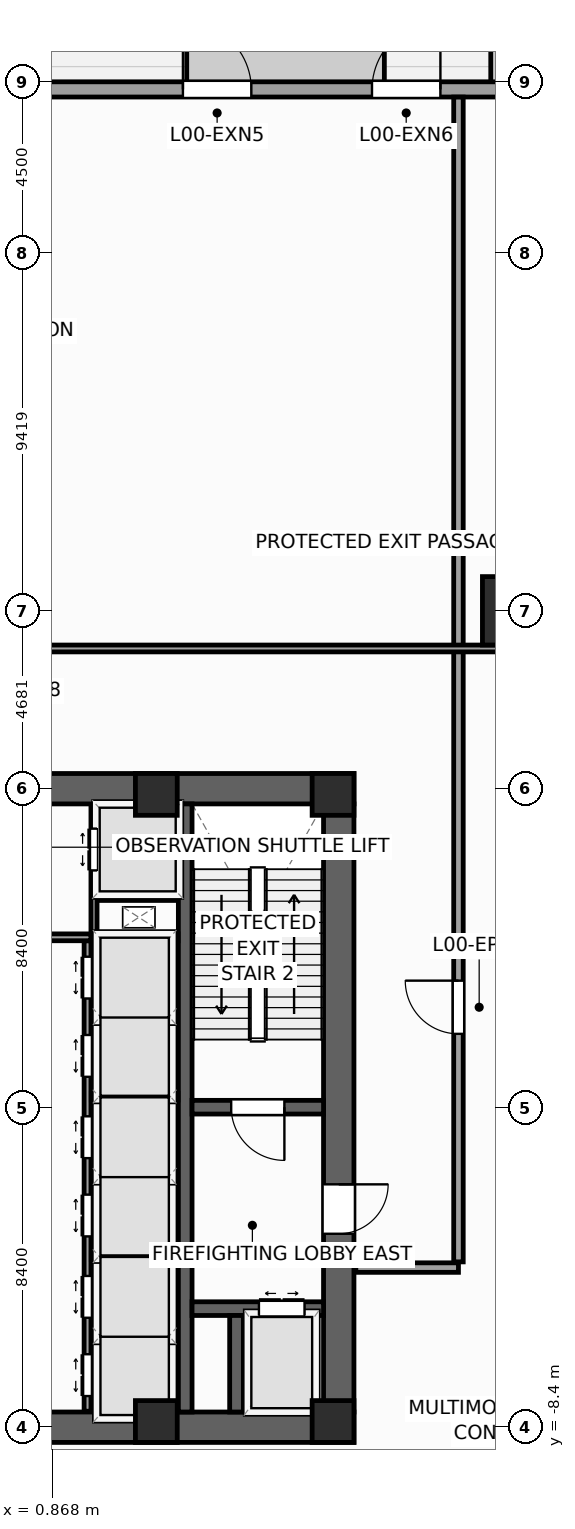
"""IFC4 building model, lengths in metres.
Left out: names, types, materials, properties, quantities, classifications, styles, units other than length and angle.
Written with IfcOpenShell. Run it as: python <this file> out.ifc"""

import sys

from ifc_helpers import new_model, si_unit, direction, frame, frame_2d, origin, origin_2d, place, context, subcontext, project, spatial, rectangle, extrude, source, transform, mapped, element, fill, save


model = new_model("IFC4")
c1 = context("Model", 3, precision=1e-05, world=origin(), true_north=direction((0.0, 1.0)))
c2 = subcontext(c1, "Body", "Model", "MODEL_VIEW")
j1 = project(units=[si_unit("LENGTHUNIT", "METRE"), si_unit("PLANEANGLEUNIT", "RADIAN")], contexts=[c1])
p1 = place(None, origin())
s1 = spatial("IfcSite", under=j1, at=p1, CompositionType="ELEMENT")
p2 = place(p1, origin())
s2 = spatial("IfcBuilding", under=s1, at=p2, CompositionType="ELEMENT")
p3 = place(p2, origin())
s3 = spatial("IfcBuildingStorey", under=s2, at=p3, CompositionType="ELEMENT", Elevation=0.0)
p4 = place(p3, frame((-8.8, -8.4, 0.0), z_axis=(0.0, 0.0, 1.0), x_axis=(1.0, 0.0, 0.0)))
e1 = element("IfcWall", 1, at=p4, inside=s3, PredefinedType="SHEAR", context=c2, shape_type="SweptSolid", body=[
    extrude(rectangle(XDim=17.6, YDim=0.8, at=frame_2d((8.8, 0.0))), origin(), (0.0, 0.0, 1.0), 6.0),
])
p5 = place(p4, frame((8.15, 0.0, 0.0)))
e2 = element("IfcOpeningElement", 2, at=p5, cuts=e1, PredefinedType="OPENING", context=c2, shape_type="SweptSolid", body=[
    extrude(rectangle(XDim=1.3, YDim=2.2, at=frame_2d((0.65, 1.1))), frame((0.0, 0.41, 0.0), z_axis=(0.0, -1.0, 0.0), x_axis=(1.0, 0.0, 0.0)), (0.0, 0.0, 1.0), 0.82),
])
p6 = place(p3, frame((-8.8, 8.4, 0.0), z_axis=(0.0, 0.0, 1.0), x_axis=(1.0, 0.0, 0.0)))
e3 = element("IfcWall", 3, at=p6, inside=s3, PredefinedType="SHEAR", context=c2, shape_type="SweptSolid", body=[
    extrude(rectangle(XDim=17.6, YDim=0.8, at=frame_2d((8.8, 0.0))), origin(), (0.0, 0.0, 1.0), 6.0),
])
p7 = place(p6, frame((8.15, 0.0, 0.0)))
e4 = element("IfcOpeningElement", 4, at=p7, cuts=e3, PredefinedType="OPENING", context=c2, shape_type="SweptSolid", body=[
    extrude(rectangle(XDim=1.3, YDim=2.2, at=frame_2d((0.65, 1.1))), frame((0.0, 0.41, 0.0), z_axis=(0.0, -1.0, 0.0), x_axis=(1.0, 0.0, 0.0)), (0.0, 0.0, 1.0), 0.82),
])
p8 = place(p3, frame((8.4, -8.0, 0.0), z_axis=(0.0, 0.0, 1.0), x_axis=(0.0, 1.0, 0.0)))
e5 = element("IfcWall", 5, at=p8, inside=s3, PredefinedType="SHEAR", context=c2, shape_type="SweptSolid", body=[
    extrude(rectangle(XDim=16.0, YDim=0.8, at=frame_2d((8.0, 0.0))), origin(), (0.0, 0.0, 1.0), 6.0),
])
p9 = place(p8, frame((4.69, 0.0, 0.0)))
e6 = element("IfcOpeningElement", 6, at=p9, cuts=e5, PredefinedType="OPENING", context=c2, shape_type="SweptSolid", body=[
    extrude(rectangle(XDim=1.3, YDim=2.2, at=frame_2d((0.65, 1.1))), frame((0.0, 0.41, 0.0), z_axis=(0.0, -1.0, 0.0), x_axis=(1.0, 0.0, 0.0)), (0.0, 0.0, 1.0), 0.82),
])
p10 = place(p3, frame((4.36, -8.0, 0.0), z_axis=(0.0, 0.0, 1.0), x_axis=(0.0, 1.0, 0.0)))
e7 = element("IfcWall", 7, at=p10, inside=s3, PredefinedType="SHEAR", context=c2, shape_type="SweptSolid", body=[
    extrude(rectangle(XDim=16.0, YDim=0.36, at=frame_2d((8.0, 0.0))), origin(), (0.0, 0.0, 1.0), 6.0),
])
p11 = place(p3, frame((4.54, 0.02, 0.0), z_axis=(0.0, 0.0, 1.0), x_axis=(1.0, 0.0, 0.0)))
e8 = element("IfcWall", 8, at=p11, inside=s3, PredefinedType="SHEAR", context=c2, shape_type="SweptSolid", body=[
    extrude(rectangle(XDim=3.46, YDim=0.36, at=frame_2d((1.73, 0.0))), origin(), (0.0, 0.0, 1.0), 6.0),
])
p12 = place(p11, frame((1.03, 0.0, 0.0)))
e9 = element("IfcOpeningElement", 9, at=p12, cuts=e8, PredefinedType="OPENING", context=c2, shape_type="SweptSolid", body=[
    extrude(rectangle(XDim=1.4, YDim=2.2, at=frame_2d((0.7, 1.1))), frame((0.0, 0.19, 0.0), z_axis=(0.0, -1.0, 0.0), x_axis=(1.0, 0.0, 0.0)), (0.0, 0.0, 1.0), 0.38),
])
p13 = place(p3, frame((4.54, -5.28, 0.0), z_axis=(0.0, 0.0, 1.0), x_axis=(1.0, 0.0, 0.0)))
e10 = element("IfcWall", 10, at=p13, inside=s3, PredefinedType="SHEAR", context=c2, shape_type="SweptSolid", body=[
    extrude(rectangle(XDim=3.46, YDim=0.36, at=frame_2d((1.73, 0.0))), origin(), (0.0, 0.0, 1.0), 6.0),
])
p14 = place(p13, frame((1.76, 0.0, 0.0)))
e11 = element("IfcOpeningElement", 11, at=p14, cuts=e10, PredefinedType="OPENING", context=c2, shape_type="SweptSolid", body=[
    extrude(rectangle(XDim=1.2, YDim=2.25, at=frame_2d((0.6, 1.125))), frame((0.0, 0.19, 0.0), z_axis=(0.0, -1.0, 0.0), x_axis=(1.0, 0.0, 0.0)), (0.0, 0.0, 1.0), 0.38),
])
p15 = place(p3, frame((5.71, -8.0, 0.0), z_axis=(0.0, 0.0, 1.0), x_axis=(0.0, 1.0, 0.0)))
e12 = element("IfcWall", 12, at=p15, inside=s3, PredefinedType="SHEAR", context=c2, shape_type="SweptSolid", body=[
    extrude(rectangle(XDim=2.54, YDim=0.36, at=frame_2d((1.27, 0.0))), origin(), (0.0, 0.0, 1.0), 6.0),
])
m1 = source(origin(), c2, "Body", "SweptSolid", [
    extrude(rectangle(XDim=1.1, YDim=1.1, at=origin_2d()), origin(), (0.0, 0.0, 1.0), 6.0),
])
for number, where, z_axis, x_axis in (
    (13, (8.25, -8.25, 0.0), (0.0, 0.0, 1.0), (1.0, 0.0, 0.0)),
    (14, (8.25, 8.25, 0.0), (0.0, 0.0, 1.0), (1.0, 0.0, 0.0)),
    (15, (3.6, -8.25, 0.0), (0.0, 0.0, 1.0), (1.0, 0.0, 0.0)),
    (16, (3.6, 8.25, 0.0), (0.0, 0.0, 1.0), (1.0, 0.0, 0.0)),
):
    element("IfcColumn", number, at=place(p3, frame(where, z_axis=z_axis, x_axis=x_axis)), inside=s3, PredefinedType="PILASTER", context=c2, shape_type="MappedRepresentation", body=[
        mapped(m1, transform((0.0, 0.0, 0.0), scale=1.0)),
    ])
m2 = source(origin(), c2, "Body", "SweptSolid", [
    extrude(rectangle(XDim=1.8, YDim=1.8, at=origin_2d()), origin(), (0.0, 0.0, 1.0), 6.0),
])
p16 = place(p3, frame((13.081, 13.081, 0.0), z_axis=(0.0, 0.0, 1.0), x_axis=(1.0, 0.0, 0.0)))
e17 = element("IfcColumn", 17, at=p16, inside=s3, PredefinedType="COLUMN", context=c2, shape_type="MappedRepresentation", body=[
    mapped(m2, transform((0.0, 0.0, 0.0), scale=1.0)),
])
p17 = place(p3, frame((-30.0, 26.8, 0.0), z_axis=(0.0, 0.0, 1.0), x_axis=(1.0, 0.0, 0.0)))
e18 = element("IfcWall", 18, at=p17, inside=s3, PredefinedType="STANDARD", context=c2, shape_type="SweptSolid", body=[
    extrude(rectangle(XDim=50.0, YDim=0.4, at=frame_2d((25.0, 0.0))), origin(), (0.0, 0.0, 1.0), 5.66),
])
p18 = place(p17, frame((9.6, 0.0, 0.0)))
e19 = element("IfcOpeningElement", 19, at=p18, cuts=e18, PredefinedType="OPENING", context=c2, shape_type="SweptSolid", body=[
    extrude(rectangle(XDim=1.8, YDim=2.4, at=frame_2d((0.9, 1.2))), frame((0.0, 0.21, 0.0), z_axis=(0.0, -1.0, 0.0), x_axis=(1.0, 0.0, 0.0)), (0.0, 0.0, 1.0), 0.42),
])
p19 = place(p17, frame((14.3, 0.0, 0.0)))
e20 = element("IfcOpeningElement", 20, at=p19, cuts=e18, PredefinedType="OPENING", context=c2, shape_type="SweptSolid", body=[
    extrude(rectangle(XDim=1.8, YDim=2.4, at=frame_2d((0.9, 1.2))), frame((0.0, 0.21, 0.0), z_axis=(0.0, -1.0, 0.0), x_axis=(1.0, 0.0, 0.0)), (0.0, 0.0, 1.0), 0.42),
])
p20 = place(p17, frame((18.925, 0.0, 0.0)))
e21 = element("IfcOpeningElement", 21, at=p20, cuts=e18, PredefinedType="OPENING", context=c2, shape_type="SweptSolid", body=[
    extrude(rectangle(XDim=1.8, YDim=2.4, at=frame_2d((0.9, 1.2))), frame((0.0, 0.21, 0.0), z_axis=(0.0, -1.0, 0.0), x_axis=(1.0, 0.0, 0.0)), (0.0, 0.0, 1.0), 0.42),
])
p21 = place(p17, frame((23.9, 0.0, 0.0)))
e22 = element("IfcOpeningElement", 22, at=p21, cuts=e18, PredefinedType="OPENING", context=c2, shape_type="SweptSolid", body=[
    extrude(rectangle(XDim=1.8, YDim=2.4, at=frame_2d((0.9, 1.2))), frame((0.0, 0.21, 0.0), z_axis=(0.0, -1.0, 0.0), x_axis=(1.0, 0.0, 0.0)), (0.0, 0.0, 1.0), 0.42),
])
p22 = place(p17, frame((34.3, 0.0, 0.0)))
e23 = element("IfcOpeningElement", 23, at=p22, cuts=e18, PredefinedType="OPENING", context=c2, shape_type="SweptSolid", body=[
    extrude(rectangle(XDim=1.8, YDim=2.4, at=frame_2d((0.9, 1.2))), frame((0.0, 0.21, 0.0), z_axis=(0.0, -1.0, 0.0), x_axis=(1.0, 0.0, 0.0)), (0.0, 0.0, 1.0), 0.42),
])
p23 = place(p17, frame((39.275, 0.0, 0.0)))
e24 = element("IfcOpeningElement", 24, at=p23, cuts=e18, PredefinedType="OPENING", context=c2, shape_type="SweptSolid", body=[
    extrude(rectangle(XDim=1.8, YDim=2.4, at=frame_2d((0.9, 1.2))), frame((0.0, 0.21, 0.0), z_axis=(0.0, -1.0, 0.0), x_axis=(1.0, 0.0, 0.0)), (0.0, 0.0, 1.0), 0.42),
])
p24 = place(p17, frame((46.6, 0.0, 0.0)))
e25 = element("IfcOpeningElement", 25, at=p24, cuts=e18, PredefinedType="OPENING", context=c2, shape_type="SweptSolid", body=[
    extrude(rectangle(XDim=1.8, YDim=2.4, at=frame_2d((0.9, 1.2))), frame((0.0, 0.21, 0.0), z_axis=(0.0, -1.0, 0.0), x_axis=(1.0, 0.0, 0.0)), (0.0, 0.0, 1.0), 0.42),
])
p25 = place(p3, frame((1.79, -7.98, 0.0), z_axis=(0.0, 0.0, 1.0), x_axis=(0.0, 1.0, 0.0)))
e26 = element("IfcWall", 26, at=p25, inside=s3, PredefinedType="PARTITIONING", context=c2, shape_type="SweptSolid", body=[
    extrude(rectangle(XDim=12.38, YDim=0.18, at=frame_2d((6.19, 0.0))), origin(), (0.0, 0.0, 1.0), 5.66),
])
p26 = place(p25, frame((0.4, 0.0, 0.0)))
e27 = element("IfcOpeningElement", 27, at=p26, cuts=e26, PredefinedType="OPENING", context=c2, shape_type="SweptSolid", body=[
    extrude(rectangle(XDim=1.1, YDim=2.2, at=frame_2d((0.55, 1.1))), frame((0.0, 0.1, 0.0), z_axis=(0.0, -1.0, 0.0), x_axis=(1.0, 0.0, 0.0)), (0.0, 0.0, 1.0), 0.2),
])
p27 = place(p25, frame((2.46, 0.0, 0.0)))
e28 = element("IfcOpeningElement", 28, at=p27, cuts=e26, PredefinedType="OPENING", context=c2, shape_type="SweptSolid", body=[
    extrude(rectangle(XDim=1.1, YDim=2.2, at=frame_2d((0.55, 1.1))), frame((0.0, 0.1, 0.0), z_axis=(0.0, -1.0, 0.0), x_axis=(1.0, 0.0, 0.0)), (0.0, 0.0, 1.0), 0.2),
])
p28 = place(p25, frame((4.6, 0.0, 0.0)))
e29 = element("IfcOpeningElement", 29, at=p28, cuts=e26, PredefinedType="OPENING", context=c2, shape_type="SweptSolid", body=[
    extrude(rectangle(XDim=1.1, YDim=2.2, at=frame_2d((0.55, 1.1))), frame((0.0, 0.1, 0.0), z_axis=(0.0, -1.0, 0.0), x_axis=(1.0, 0.0, 0.0)), (0.0, 0.0, 1.0), 0.2),
])
p29 = place(p25, frame((6.66, 0.0, 0.0)))
e30 = element("IfcOpeningElement", 30, at=p29, cuts=e26, PredefinedType="OPENING", context=c2, shape_type="SweptSolid", body=[
    extrude(rectangle(XDim=1.1, YDim=2.2, at=frame_2d((0.55, 1.1))), frame((0.0, 0.1, 0.0), z_axis=(0.0, -1.0, 0.0), x_axis=(1.0, 0.0, 0.0)), (0.0, 0.0, 1.0), 0.2),
])
p30 = place(p25, frame((8.8, 0.0, 0.0)))
e31 = element("IfcOpeningElement", 31, at=p30, cuts=e26, PredefinedType="OPENING", context=c2, shape_type="SweptSolid", body=[
    extrude(rectangle(XDim=1.1, YDim=2.2, at=frame_2d((0.55, 1.1))), frame((0.0, 0.1, 0.0), z_axis=(0.0, -1.0, 0.0), x_axis=(1.0, 0.0, 0.0)), (0.0, 0.0, 1.0), 0.2),
])
p31 = place(p25, frame((10.86, 0.0, 0.0)))
e32 = element("IfcOpeningElement", 32, at=p31, cuts=e26, PredefinedType="OPENING", context=c2, shape_type="SweptSolid", body=[
    extrude(rectangle(XDim=1.1, YDim=2.2, at=frame_2d((0.55, 1.1))), frame((0.0, 0.1, 0.0), z_axis=(0.0, -1.0, 0.0), x_axis=(1.0, 0.0, 0.0)), (0.0, 0.0, 1.0), 0.2),
])
p32 = place(p3, frame((-1.88, 4.49, 0.0), z_axis=(0.0, 0.0, 1.0), x_axis=(1.0, 0.0, 0.0)))
e33 = element("IfcWall", 33, at=p32, inside=s3, PredefinedType="PARTITIONING", context=c2, shape_type="SweptSolid", body=[
    extrude(rectangle(XDim=3.76, YDim=0.18, at=frame_2d((1.88, 0.0))), origin(), (0.0, 0.0, 1.0), 5.66),
])
p33 = place(p32, frame((1.23, 0.0, 0.0)))
e34 = element("IfcOpeningElement", 34, at=p33, cuts=e33, PredefinedType="OPENING", context=c2, shape_type="SweptSolid", body=[
    extrude(rectangle(XDim=1.3, YDim=2.2, at=frame_2d((0.65, 1.1))), frame((0.0, 0.1, 0.0), z_axis=(0.0, -1.0, 0.0), x_axis=(1.0, 0.0, 0.0)), (0.0, 0.0, 1.0), 0.2),
])
for number, where, z_axis, x_axis in (
    (35, (1.89, -3.9, 0.0), (0.0, 0.0, 1.0), (1.0, 0.0, 0.0)),
    (36, (1.89, 0.3, 0.0), (0.0, 0.0, 1.0), (1.0, 0.0, 0.0)),
    (37, (1.89, 4.49, 0.0), (0.0, 0.0, 1.0), (1.0, 0.0, 0.0)),
):
    element("IfcWall", number, at=place(p3, frame(where, z_axis=z_axis, x_axis=x_axis)), inside=s3, PredefinedType="PARTITIONING", context=c2, shape_type="SweptSolid", body=[
        extrude(rectangle(XDim=2.28, YDim=0.18, at=frame_2d((1.14, 0.0))), origin(), (0.0, 0.0, 1.0), 5.66),
    ])
for number, where, z_axis, x_axis in (
    (38, (1.9, -6.0, 0.0), (0.0, 0.0, 1.0), (1.0, 0.0, 0.0)),
    (39, (1.9, -1.8, 0.0), (0.0, 0.0, 1.0), (1.0, 0.0, 0.0)),
    (40, (1.9, 2.4, 0.0), (0.0, 0.0, 1.0), (1.0, 0.0, 0.0)),
):
    element("IfcWall", number, at=place(p3, frame(where, z_axis=z_axis, x_axis=x_axis)), inside=s3, PredefinedType="PARTITIONING", context=c2, shape_type="SweptSolid", body=[
        extrude(rectangle(XDim=2.26, YDim=0.12, at=frame_2d((1.13, 0.0))), origin(), (0.0, 0.0, 1.0), 5.66),
    ])
p34 = place(p3, frame((1.96, 4.58, 0.0), z_axis=(0.0, 0.0, 1.0), x_axis=(0.0, 1.0, 0.0)))
e41 = element("IfcWall", 41, at=p34, inside=s3, PredefinedType="PARTITIONING", context=c2, shape_type="SweptSolid", body=[
    extrude(rectangle(XDim=3.4, YDim=0.16, at=frame_2d((1.7, 0.0))), origin(), (0.0, 0.0, 1.0), 5.66),
])
p35 = place(p34, frame((1.67, 0.0, 0.0)))
e42 = element("IfcOpeningElement", 42, at=p35, cuts=e41, PredefinedType="OPENING", context=c2, shape_type="SweptSolid", body=[
    extrude(rectangle(XDim=1.1, YDim=2.2, at=frame_2d((0.55, 1.1))), frame((0.0, 0.09, 0.0), z_axis=(0.0, -1.0, 0.0), x_axis=(1.0, 0.0, 0.0)), (0.0, 0.0, 1.0), 0.18),
])
p36 = place(p3, frame((2.06, 5.52, 0.0), z_axis=(0.0, 0.0, 1.0), x_axis=(1.0, 0.0, 0.0)))
e43 = element("IfcWall", 43, at=p36, inside=s3, PredefinedType="PARTITIONING", context=c2, shape_type="SweptSolid", body=[
    extrude(rectangle(XDim=2.1, YDim=0.12, at=frame_2d((1.05, 0.0))), origin(), (0.0, 0.0, 1.0), 5.66),
])
p37 = place(p3, frame((11.55, -4.05, 0.0), z_axis=(0.0, 0.0, 1.0), x_axis=(0.0, 1.0, 0.0)))
e44 = element("IfcWall", 44, at=p37, inside=s3, PredefinedType="PARTITIONING", context=c2, shape_type="SweptSolid", body=[
    extrude(rectangle(XDim=30.648, YDim=0.25, at=frame_2d((15.324, 0.0))), origin(), (0.0, 0.0, 1.0), 5.66),
])
p38 = place(p37, frame((6.0, 0.0, 0.0)))
e45 = element("IfcOpeningElement", 45, at=p38, cuts=e44, PredefinedType="OPENING", context=c2, shape_type="SweptSolid", body=[
    extrude(rectangle(XDim=1.4, YDim=2.2, at=frame_2d((0.7, 1.1))), frame((0.0, 0.135, 0.0), z_axis=(0.0, -1.0, 0.0), x_axis=(1.0, 0.0, 0.0)), (0.0, 0.0, 1.0), 0.27),
])
p39 = place(p3, frame((8.85, -4.2, 0.0), z_axis=(0.0, 0.0, 1.0), x_axis=(1.0, 0.0, 0.0)))
e46 = element("IfcWall", 46, at=p39, inside=s3, PredefinedType="PARTITIONING", context=c2, shape_type="SweptSolid", body=[
    extrude(rectangle(XDim=2.7, YDim=0.25, at=frame_2d((1.35, 0.0))), origin(), (0.0, 0.0, 1.0), 5.66),
])
p40 = place(p3, frame((-14.5, 12.09, 0.0), z_axis=(0.0, 0.0, 1.0), x_axis=(1.0, 0.0, 0.0)))
e47 = element("IfcWall", 47, at=p40, inside=s3, PredefinedType="PARTITIONING", context=c2, shape_type="SweptSolid", body=[
    extrude(rectangle(XDim=29.0, YDim=0.18, at=frame_2d((14.5, 0.0))), origin(), (0.0, 0.0, 1.0), 5.66),
])
p41 = place(p40, frame((13.7, 0.0, 0.0)))
e48 = element("IfcOpeningElement", 48, at=p41, cuts=e47, PredefinedType="OPENING", context=c2, shape_type="SweptSolid", body=[
    extrude(rectangle(XDim=1.6, YDim=2.5, at=frame_2d((0.8, 1.25))), frame((0.0, 0.1, 0.0), z_axis=(0.0, -1.0, 0.0), x_axis=(1.0, 0.0, 0.0)), (0.0, 0.0, 1.0), 0.2),
])
m3 = source(origin(), c2, "Body", "SweptSolid", [
    extrude(rectangle(XDim=1.8, YDim=2.4, at=frame_2d((0.9, 1.2))), frame((0.0, 0.025, 0.0), z_axis=(0.0, -1.0, 0.0), x_axis=(1.0, 0.0, 0.0)), (0.0, 0.0, 1.0), 0.05),
])
p42 = place(p22, origin())
e49 = element("IfcDoor", 49, at=p42, inside=s3, OperationType="SINGLE_SWING_LEFT", PredefinedType="DOOR", context=c2, shape_type="MappedRepresentation", body=[
    mapped(m3, transform((0.0, 0.0, 0.0), scale=1.0)),
])
fill(e23, e49)
p43 = place(p23, origin())
e50 = element("IfcDoor", 50, at=p43, inside=s3, OperationType="SINGLE_SWING_RIGHT", PredefinedType="DOOR", context=c2, shape_type="MappedRepresentation", body=[
    mapped(m3, transform((0.0, 0.0, 0.0), scale=1.0)),
])
fill(e24, e50)
m4 = source(origin(), c2, "Body", "SweptSolid", [
    extrude(rectangle(XDim=1.4, YDim=2.2, at=frame_2d((0.7, 1.1))), frame((0.0, 0.025, 0.0), z_axis=(0.0, -1.0, 0.0), x_axis=(1.0, 0.0, 0.0)), (0.0, 0.0, 1.0), 0.05),
])
p44 = place(p12, frame((1.4, 0.0, 0.0), z_axis=(0.0, 0.0, 1.0), x_axis=(-1.0, 0.0, 0.0)))
e51 = element("IfcDoor", 51, at=p44, inside=s3, OperationType="SINGLE_SWING_RIGHT", PredefinedType="DOOR", context=c2, shape_type="MappedRepresentation", body=[
    mapped(m4, transform((0.0, 0.0, 0.0), scale=1.0)),
])
fill(e9, e51)
m5 = source(origin(), c2, "Body", "SweptSolid", [
    extrude(rectangle(XDim=1.3, YDim=2.2, at=frame_2d((0.65, 1.1))), frame((0.0, 0.025, 0.0), z_axis=(0.0, -1.0, 0.0), x_axis=(1.0, 0.0, 0.0)), (0.0, 0.0, 1.0), 0.05),
])
p45 = place(p9, frame((1.3, 0.0, 0.0), z_axis=(0.0, 0.0, 1.0), x_axis=(-1.0, 0.0, 0.0)))
e52 = element("IfcDoor", 52, at=p45, inside=s3, OperationType="SINGLE_SWING_RIGHT", PredefinedType="DOOR", context=c2, shape_type="MappedRepresentation", body=[
    mapped(m5, transform((0.0, 0.0, 0.0), scale=1.0)),
])
fill(e6, e52)
m6 = source(origin(), c2, "Body", "SweptSolid", [
    extrude(rectangle(XDim=1.2, YDim=2.25, at=frame_2d((0.6, 1.125))), frame((0.0, 0.025, 0.0), z_axis=(0.0, -1.0, 0.0), x_axis=(1.0, 0.0, 0.0)), (0.0, 0.0, 1.0), 0.05),
])
p46 = place(p14, origin())
e53 = element("IfcDoor", 53, at=p46, inside=s3, OperationType="DOUBLE_DOOR_SLIDING", PredefinedType="DOOR", context=c2, shape_type="MappedRepresentation", body=[
    mapped(m6, transform((0.0, 0.0, 0.0), scale=1.0)),
])
fill(e11, e53)
m7 = source(origin(), c2, "Body", "SweptSolid", [
    extrude(rectangle(XDim=1.1, YDim=2.2, at=frame_2d((0.55, 1.1))), frame((0.0, 0.025, 0.0), z_axis=(0.0, -1.0, 0.0), x_axis=(1.0, 0.0, 0.0)), (0.0, 0.0, 1.0), 0.05),
])
p47 = place(p26, origin())
e54 = element("IfcDoor", 54, at=p47, inside=s3, OperationType="DOUBLE_DOOR_SLIDING", PredefinedType="DOOR", context=c2, shape_type="MappedRepresentation", body=[
    mapped(m7, transform((0.0, 0.0, 0.0), scale=1.0)),
])
fill(e27, e54)
p48 = place(p27, origin())
e55 = element("IfcDoor", 55, at=p48, inside=s3, OperationType="DOUBLE_DOOR_SLIDING", PredefinedType="DOOR", context=c2, shape_type="MappedRepresentation", body=[
    mapped(m7, transform((0.0, 0.0, 0.0), scale=1.0)),
])
fill(e28, e55)
p49 = place(p28, origin())
e56 = element("IfcDoor", 56, at=p49, inside=s3, OperationType="DOUBLE_DOOR_SLIDING", PredefinedType="DOOR", context=c2, shape_type="MappedRepresentation", body=[
    mapped(m7, transform((0.0, 0.0, 0.0), scale=1.0)),
])
fill(e29, e56)
p50 = place(p29, origin())
e57 = element("IfcDoor", 57, at=p50, inside=s3, OperationType="DOUBLE_DOOR_SLIDING", PredefinedType="DOOR", context=c2, shape_type="MappedRepresentation", body=[
    mapped(m7, transform((0.0, 0.0, 0.0), scale=1.0)),
])
fill(e30, e57)
p51 = place(p30, origin())
e58 = element("IfcDoor", 58, at=p51, inside=s3, OperationType="DOUBLE_DOOR_SLIDING", PredefinedType="DOOR", context=c2, shape_type="MappedRepresentation", body=[
    mapped(m7, transform((0.0, 0.0, 0.0), scale=1.0)),
])
fill(e31, e58)
p52 = place(p31, origin())
e59 = element("IfcDoor", 59, at=p52, inside=s3, OperationType="DOUBLE_DOOR_SLIDING", PredefinedType="DOOR", context=c2, shape_type="MappedRepresentation", body=[
    mapped(m7, transform((0.0, 0.0, 0.0), scale=1.0)),
])
fill(e32, e59)
p53 = place(p35, origin())
e60 = element("IfcDoor", 60, at=p53, inside=s3, OperationType="DOUBLE_DOOR_SLIDING", PredefinedType="DOOR", context=c2, shape_type="MappedRepresentation", body=[
    mapped(m7, transform((0.0, 0.0, 0.0), scale=1.0)),
])
fill(e42, e60)
p54 = place(p38, origin())
e61 = element("IfcDoor", 61, at=p54, inside=s3, OperationType="SINGLE_SWING_RIGHT", PredefinedType="DOOR", context=c2, shape_type="MappedRepresentation", body=[
    mapped(m4, transform((0.0, 0.0, 0.0), scale=1.0)),
])
fill(e45, e61)
save(model, sys.argv[1])
